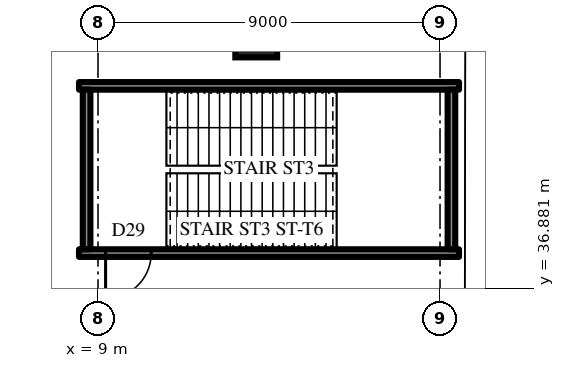
"""IFC4 building model, lengths in metres.
Left out: names, types, materials, properties, quantities, classifications, styles, units other than length and angle.
Written with IfcOpenShell. Run it as: python <this file> out.ifc"""

import sys

from ifc_helpers import new_model, si_unit, direction, frame, frame_2d, origin, origin_2d, place, context, subcontext, project, spatial, rectangle, extrude, element, fill, save


model = new_model("IFC4")
c1 = context("Model", 3, precision=1e-05, world=origin(), true_north=direction((0.0, 1.0)))
c2 = subcontext(c1, "Body", "Model", "MODEL_VIEW")
j1 = project(units=[si_unit("LENGTHUNIT", "METRE"), si_unit("PLANEANGLEUNIT", "RADIAN")], contexts=[c1])
p1 = place(None, origin())
s1 = spatial("IfcSite", under=j1, at=p1, CompositionType="ELEMENT")
p2 = place(p1, origin())
s2 = spatial("IfcBuilding", under=s1, at=p2, CompositionType="ELEMENT")
p3 = place(p2, frame((0.0, 0.0, 7.0)))
s3 = spatial("IfcBuildingStorey", under=s2, at=p3, CompositionType="ELEMENT", Elevation=7.0)
p4 = place(p3, frame((8.5, 37.8, 0.0), z_axis=(0.0, 0.0, 1.0), x_axis=(1.0, 0.0, 0.0)))
e1 = element("IfcWall", 1, at=p4, inside=s3, PredefinedType="SHEAR", context=c2, shape_type="SweptSolid", body=[
    extrude(rectangle(XDim=10.0, YDim=0.2, at=frame_2d((5.0, 0.0))), origin(), (0.0, 0.0, 1.0), 6.0),
])
p5 = place(p4, frame((0.7, 0.0, 0.0)))
e2 = element("IfcOpeningElement", 2, at=p5, cuts=e1, PredefinedType="OPENING", context=c2, shape_type="SweptSolid", body=[
    extrude(rectangle(XDim=1.2, YDim=2.2, at=frame_2d((0.6, 1.1))), frame((0.0, 0.11, 0.0), z_axis=(0.0, -1.0, 0.0), x_axis=(1.0, 0.0, 0.0)), (0.0, 0.0, 1.0), 0.22),
])
p6 = place(p3, frame((18.5, 42.2, 0.0), z_axis=(0.0, 0.0, 1.0), x_axis=(-1.0, 0.0, 0.0)))
e3 = element("IfcWall", 3, at=p6, inside=s3, PredefinedType="SHEAR", context=c2, shape_type="SweptSolid", body=[
    extrude(rectangle(XDim=10.0, YDim=0.2, at=frame_2d((5.0, 0.0))), origin(), (0.0, 0.0, 1.0), 6.0),
])
for number, where, z_axis, x_axis in (
    (4, (8.7, 42.1, 0.0), (0.0, 0.0, 1.0), (0.0, -1.0, 0.0)),
    (5, (18.3, 37.9, 0.0), (0.0, 0.0, 1.0), (0.0, 1.0, 0.0)),
):
    element("IfcWall", number, at=place(p3, frame(where, z_axis=z_axis, x_axis=x_axis)), inside=s3, PredefinedType="SHEAR", context=c2, shape_type="SweptSolid", body=[
        extrude(rectangle(XDim=4.2, YDim=0.2, at=frame_2d((2.1, 0.0))), origin(), (0.0, 0.0, 1.0), 6.0),
    ])
p7 = place(p3, frame((13.164, 43.5, 0.0), z_axis=(0.0, 0.0, 1.0), x_axis=(-1.0, 0.0, 0.0)))
e6 = element("IfcColumn", 6, at=p7, inside=s3, PredefinedType="COLUMN", context=c2, shape_type="SweptSolid", body=[
    extrude(rectangle(XDim=1.1, YDim=1.1, at=origin_2d()), origin(), (0.0, 0.0, 1.0), 6.0),
])
p8 = place(p5, frame((1.2, 0.0, 0.0), z_axis=(0.0, 0.0, 1.0), x_axis=(-1.0, 0.0, 0.0)))
e7 = element("IfcDoor", 7, at=p8, inside=s3, OperationType="SINGLE_SWING_LEFT", PredefinedType="DOOR", context=c2, shape_type="SweptSolid", body=[
    extrude(rectangle(XDim=1.2, YDim=2.2, at=frame_2d((0.6, 1.1))), frame((0.0, 0.025, 0.0), z_axis=(0.0, -1.0, 0.0), x_axis=(1.0, 0.0, 0.0)), (0.0, 0.0, 1.0), 0.05),
])
fill(e2, e7)
save(model, sys.argv[1])
